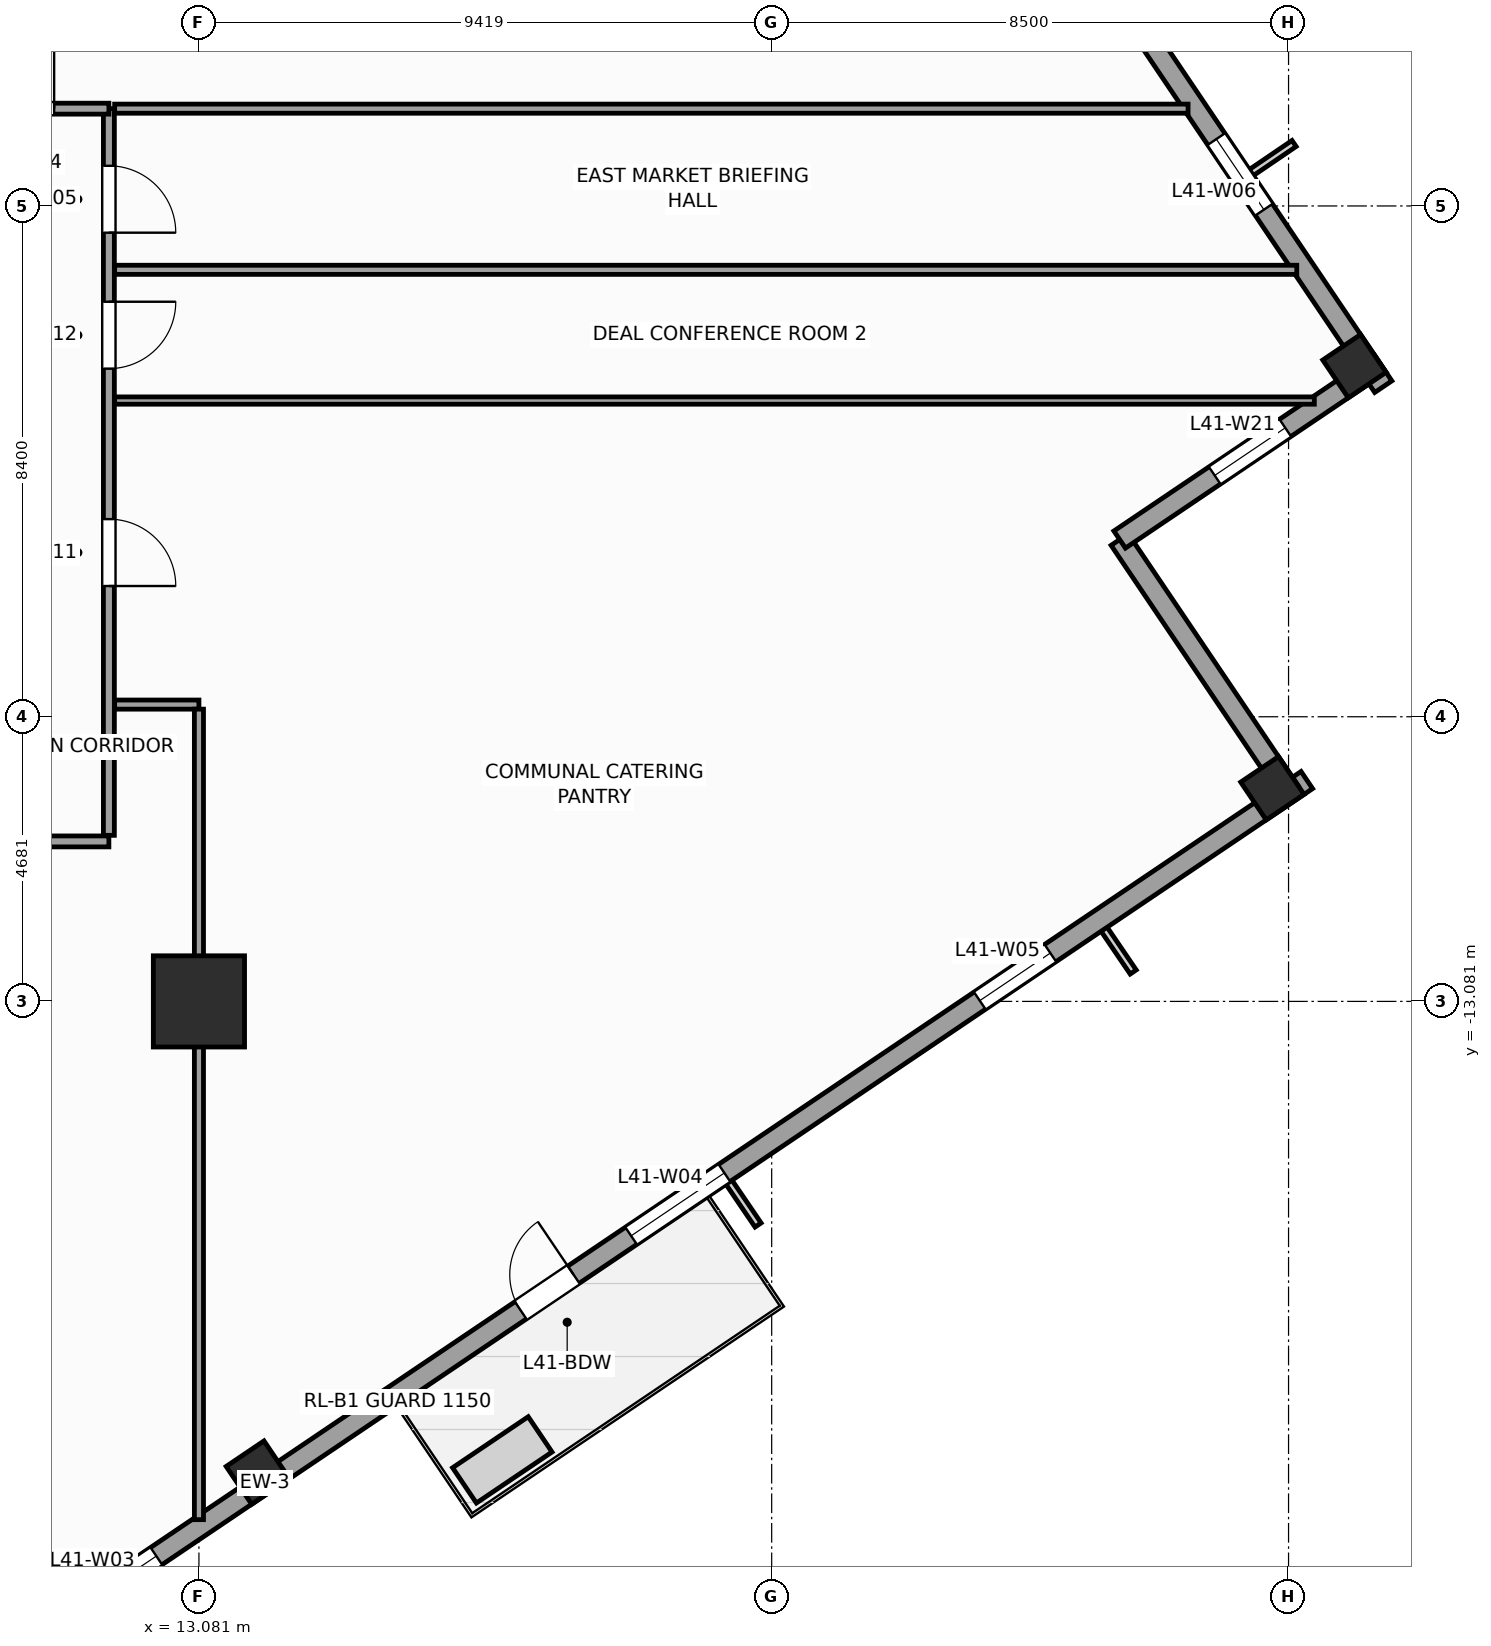
"""IFC4 building model, lengths in metres.
Left out: names, types, materials, properties, quantities, classifications, styles, units other than length and angle.
Written with IfcOpenShell. Run it as: python <this file> out.ifc"""

import sys

from ifc_helpers import new_model, si_unit, direction, frame, frame_2d, origin, origin_2d, place, context, subcontext, project, spatial, rectangle, extrude, source, transform, mapped, element, fill, save


model = new_model("IFC4")
c1 = context("Model", 3, precision=1e-05, world=origin(), true_north=direction((0.0, 1.0)))
c2 = subcontext(c1, "Body", "Model", "MODEL_VIEW")
j1 = project(units=[si_unit("LENGTHUNIT", "METRE"), si_unit("PLANEANGLEUNIT", "RADIAN")], contexts=[c1])
p1 = place(None, origin())
s1 = spatial("IfcSite", under=j1, at=p1, CompositionType="ELEMENT")
p2 = place(p1, origin())
s2 = spatial("IfcBuilding", under=s1, at=p2, CompositionType="ELEMENT")
p3 = place(p2, frame((0.0, 0.0, 172.4)))
s3 = spatial("IfcBuildingStorey", under=s2, at=p3, CompositionType="ELEMENT", Elevation=172.4)
m1 = source(origin(), c2, "Body", "SweptSolid", [
    extrude(rectangle(XDim=1.5, YDim=1.5, at=origin_2d()), origin(), (0.0, 0.0, 1.0), 4.0),
])
p4 = place(p3, frame((13.081, -13.081, 0.0), z_axis=(0.0, 0.0, 1.0), x_axis=(1.0, 0.0, 0.0)))
e1 = element("IfcColumn", 1, at=p4, inside=s3, PredefinedType="COLUMN", context=c2, shape_type="MappedRepresentation", body=[
    mapped(m1, transform((0.0, 0.0, 0.0), scale=1.0)),
])
m2 = source(origin(), c2, "Body", "SweptSolid", [
    extrude(rectangle(XDim=0.75, YDim=0.75, at=origin_2d()), origin(), (0.0, 0.0, 1.0), 4.0),
])
for number, where, z_axis, x_axis in (
    (2, (14.05, -20.83, 0.0), (0.0, 0.0, 1.0), (0.829, 0.559, 0.0)),
    (3, (30.734, -9.576, 0.0), (0.0, 0.0, 1.0), (0.829, 0.559, 0.0)),
    (4, (32.083, -2.635, 0.0), (0.0, 0.0, 1.0), (0.829, 0.559, 0.0)),
):
    element("IfcColumn", number, at=place(p3, frame(where, z_axis=z_axis, x_axis=x_axis)), inside=s3, PredefinedType="COLUMN", context=c2, shape_type="MappedRepresentation", body=[
        mapped(m2, transform((0.0, 0.0, 0.0), scale=1.0)),
    ])
p5 = place(p3, frame((-2.972, -32.558, 0.0), z_axis=(0.0, 0.0, 1.0), x_axis=(0.829036218961, 0.559194910251, 0.0)))
e5 = element("IfcWall", 5, at=p5, inside=s3, PredefinedType="STANDARD", context=c2, shape_type="SweptSolid", body=[
    extrude(rectangle(XDim=41.34, YDim=0.34, at=frame_2d((20.67, 0.0))), origin(), (0.0, 0.0, 1.0), 3.04),
])
p6 = place(p5, frame((25.745, 0.0, 0.0)))
e6 = element("IfcOpeningElement", 6, at=p6, cuts=e5, PredefinedType="OPENING", context=c2, shape_type="SweptSolid", body=[
    extrude(rectangle(XDim=1.05, YDim=2.25, at=frame_2d((0.525, 1.125))), frame((0.0, 0.18, 0.0), z_axis=(0.0, -1.0, 0.0), x_axis=(1.0, 0.0, 0.0)), (0.0, 0.0, 1.0), 0.36),
])
p7 = place(p5, frame((4.261, 0.0, 0.56)))
e7 = element("IfcOpeningElement", 7, at=p7, cuts=e5, PredefinedType="OPENING", context=c2, shape_type="SweptSolid", body=[
    extrude(rectangle(XDim=1.4, YDim=2.4, at=frame_2d((0.7, 1.2))), frame((0.0, 0.18, 0.0), z_axis=(0.0, -1.0, 0.0), x_axis=(1.0, 0.0, 0.0)), (0.0, 0.0, 1.0), 0.36),
])
p8 = place(p5, frame((11.064, 0.0, 0.61)))
e8 = element("IfcOpeningElement", 8, at=p8, cuts=e5, PredefinedType="OPENING", context=c2, shape_type="SweptSolid", body=[
    extrude(rectangle(XDim=1.85, YDim=2.35, at=frame_2d((0.925, 1.175))), frame((0.0, 0.18, 0.0), z_axis=(0.0, -1.0, 0.0), x_axis=(1.0, 0.0, 0.0)), (0.0, 0.0, 1.0), 0.36),
])
p9 = place(p5, frame((16.668, 0.0, 0.61)))
e9 = element("IfcOpeningElement", 9, at=p9, cuts=e5, PredefinedType="OPENING", context=c2, shape_type="SweptSolid", body=[
    extrude(rectangle(XDim=1.85, YDim=2.35, at=frame_2d((0.925, 1.175))), frame((0.0, 0.18, 0.0), z_axis=(0.0, -1.0, 0.0), x_axis=(1.0, 0.0, 0.0)), (0.0, 0.0, 1.0), 0.36),
])
p10 = place(p5, frame((27.936, 0.0, 0.61)))
e10 = element("IfcOpeningElement", 10, at=p10, cuts=e5, PredefinedType="OPENING", context=c2, shape_type="SweptSolid", body=[
    extrude(rectangle(XDim=1.85, YDim=2.35, at=frame_2d((0.925, 1.175))), frame((0.0, 0.18, 0.0), z_axis=(0.0, -1.0, 0.0), x_axis=(1.0, 0.0, 0.0)), (0.0, 0.0, 1.0), 0.36),
])
p11 = place(p5, frame((34.852, 0.0, 0.56)))
e11 = element("IfcOpeningElement", 11, at=p11, cuts=e5, PredefinedType="OPENING", context=c2, shape_type="SweptSolid", body=[
    extrude(rectangle(XDim=1.4, YDim=2.4, at=frame_2d((0.7, 1.2))), frame((0.0, 0.18, 0.0), z_axis=(0.0, -1.0, 0.0), x_axis=(1.0, 0.0, 0.0)), (0.0, 0.0, 1.0), 0.36),
])
p12 = place(p3, frame((31.019, -9.631, 0.0), z_axis=(0.0, 0.0, 1.0), x_axis=(-0.559210350234, 0.829025804298, 0.0)))
e12 = element("IfcWall", 12, at=p12, inside=s3, PredefinedType="STANDARD", context=c2, shape_type="SweptSolid", body=[
    extrude(rectangle(XDim=5.0, YDim=0.34, at=frame_2d((2.5, 0.0))), origin(), (0.0, 0.0, 1.0), 3.74),
])
p13 = place(p3, frame((28.223, -5.486, 0.0), z_axis=(0.0, 0.0, 1.0), x_axis=(0.82905227345, 0.559171107879, 0.0)))
e13 = element("IfcWall", 13, at=p13, inside=s3, PredefinedType="STANDARD", context=c2, shape_type="SweptSolid", body=[
    extrude(rectangle(XDim=5.17, YDim=0.34, at=frame_2d((2.585, 0.0))), origin(), (0.0, 0.0, 1.0), 3.04),
])
p14 = place(p13, frame((1.885, 0.0, 0.56)))
e14 = element("IfcOpeningElement", 14, at=p14, cuts=e13, PredefinedType="OPENING", context=c2, shape_type="SweptSolid", body=[
    extrude(rectangle(XDim=1.4, YDim=2.4, at=frame_2d((0.7, 1.2))), frame((0.0, 0.18, 0.0), z_axis=(0.0, -1.0, 0.0), x_axis=(1.0, 0.0, 0.0)), (0.0, 0.0, 1.0), 0.36),
])
p15 = place(p3, frame((32.558, -2.972, 0.0), z_axis=(0.0, 0.0, 1.0), x_axis=(-0.559194910251, 0.829036218961, 0.0)))
e15 = element("IfcWall", 15, at=p15, inside=s3, PredefinedType="STANDARD", context=c2, shape_type="SweptSolid", body=[
    extrude(rectangle(XDim=41.34, YDim=0.34, at=frame_2d((20.67, 0.0))), origin(), (0.0, 0.0, 1.0), 3.04),
])
p16 = place(p15, frame((3.511, 0.0, 0.56)))
e16 = element("IfcOpeningElement", 16, at=p16, cuts=e15, PredefinedType="OPENING", context=c2, shape_type="SweptSolid", body=[
    extrude(rectangle(XDim=1.4, YDim=2.4, at=frame_2d((0.7, 1.2))), frame((0.0, 0.18, 0.0), z_axis=(0.0, -1.0, 0.0), x_axis=(1.0, 0.0, 0.0)), (0.0, 0.0, 1.0), 0.36),
])
p17 = place(p15, frame((11.064, 0.0, 0.61)))
e17 = element("IfcOpeningElement", 17, at=p17, cuts=e15, PredefinedType="OPENING", context=c2, shape_type="SweptSolid", body=[
    extrude(rectangle(XDim=1.85, YDim=2.35, at=frame_2d((0.925, 1.175))), frame((0.0, 0.18, 0.0), z_axis=(0.0, -1.0, 0.0), x_axis=(1.0, 0.0, 0.0)), (0.0, 0.0, 1.0), 0.36),
])
p18 = place(p15, frame((18.168, 0.0, 0.61)))
e18 = element("IfcOpeningElement", 18, at=p18, cuts=e15, PredefinedType="OPENING", context=c2, shape_type="SweptSolid", body=[
    extrude(rectangle(XDim=1.85, YDim=2.35, at=frame_2d((0.925, 1.175))), frame((0.0, 0.18, 0.0), z_axis=(0.0, -1.0, 0.0), x_axis=(1.0, 0.0, 0.0)), (0.0, 0.0, 1.0), 0.36),
])
p19 = place(p15, frame((27.186, 0.0, 0.61)))
e19 = element("IfcOpeningElement", 19, at=p19, cuts=e15, PredefinedType="OPENING", context=c2, shape_type="SweptSolid", body=[
    extrude(rectangle(XDim=1.85, YDim=2.35, at=frame_2d((0.925, 1.175))), frame((0.0, 0.18, 0.0), z_axis=(0.0, -1.0, 0.0), x_axis=(1.0, 0.0, 0.0)), (0.0, 0.0, 1.0), 0.36),
])
p20 = place(p15, frame((34.852, 0.0, 0.56)))
e20 = element("IfcOpeningElement", 20, at=p20, cuts=e15, PredefinedType="OPENING", context=c2, shape_type="SweptSolid", body=[
    extrude(rectangle(XDim=1.4, YDim=2.4, at=frame_2d((0.7, 1.2))), frame((0.0, 0.18, 0.0), z_axis=(0.0, -1.0, 0.0), x_axis=(1.0, 0.0, 0.0)), (0.0, 0.0, 1.0), 0.36),
])
p21 = place(p3, frame((-10.45, -10.45, 0.0), z_axis=(0.0, 0.0, 1.0), x_axis=(1.0, 0.0, 0.0)))
e21 = element("IfcWall", 21, at=p21, inside=s3, PredefinedType="PARTITIONING", context=c2, shape_type="SweptSolid", body=[
    extrude(rectangle(XDim=22.05, YDim=0.18, at=frame_2d((11.025, 0.0))), origin(), (0.0, 0.0, 1.0), 3.74),
])
p22 = place(p21, frame((15.086, 0.0, 0.0)))
e22 = element("IfcOpeningElement", 22, at=p22, cuts=e21, PredefinedType="OPENING", context=c2, shape_type="SweptSolid", body=[
    extrude(rectangle(XDim=0.95, YDim=2.1, at=frame_2d((0.475, 1.05))), frame((0.0, 0.1, 0.0), z_axis=(0.0, -1.0, 0.0), x_axis=(1.0, 0.0, 0.0)), (0.0, 0.0, 1.0), 0.2),
])
p23 = place(p21, frame((7.611, 0.0, 0.0)))
e23 = element("IfcOpeningElement", 23, at=p23, cuts=e21, PredefinedType="OPENING", context=c2, shape_type="SweptSolid", body=[
    extrude(rectangle(XDim=0.95, YDim=2.1, at=frame_2d((0.475, 1.05))), frame((0.0, 0.1, 0.0), z_axis=(0.0, -1.0, 0.0), x_axis=(1.0, 0.0, 0.0)), (0.0, 0.0, 1.0), 0.2),
])
p24 = place(p21, frame((2.939, 0.0, 0.0)))
e24 = element("IfcOpeningElement", 24, at=p24, cuts=e21, PredefinedType="OPENING", context=c2, shape_type="SweptSolid", body=[
    extrude(rectangle(XDim=1.1, YDim=2.2, at=frame_2d((0.55, 1.1))), frame((0.0, 0.1, 0.0), z_axis=(0.0, -1.0, 0.0), x_axis=(1.0, 0.0, 0.0)), (0.0, 0.0, 1.0), 0.2),
])
p25 = place(p21, frame((11.175, 0.0, 0.0)))
e25 = element("IfcOpeningElement", 25, at=p25, cuts=e21, PredefinedType="OPENING", context=c2, shape_type="SweptSolid", body=[
    extrude(rectangle(XDim=1.1, YDim=2.2, at=frame_2d((0.55, 1.1))), frame((0.0, 0.1, 0.0), z_axis=(0.0, -1.0, 0.0), x_axis=(1.0, 0.0, 0.0)), (0.0, 0.0, 1.0), 0.2),
])
p26 = place(p21, frame((18.805, 0.0, 0.0)))
e26 = element("IfcOpeningElement", 26, at=p26, cuts=e21, PredefinedType="OPENING", context=c2, shape_type="SweptSolid", body=[
    extrude(rectangle(XDim=1.1, YDim=2.2, at=frame_2d((0.55, 1.1))), frame((0.0, 0.1, 0.0), z_axis=(0.0, -1.0, 0.0), x_axis=(1.0, 0.0, 0.0)), (0.0, 0.0, 1.0), 0.2),
])
p27 = place(p3, frame((11.6, -10.35, 0.0), z_axis=(0.0, 0.0, 1.0), x_axis=(0.0, 1.0, 0.0)))
e27 = element("IfcWall", 27, at=p27, inside=s3, PredefinedType="PARTITIONING", context=c2, shape_type="SweptSolid", body=[
    extrude(rectangle(XDim=11.95, YDim=0.18, at=frame_2d((5.975, 0.0))), origin(), (0.0, 0.0, 1.0), 3.74),
])
p28 = place(p27, frame((9.911, 0.0, 0.0)))
e28 = element("IfcOpeningElement", 28, at=p28, cuts=e27, PredefinedType="OPENING", context=c2, shape_type="SweptSolid", body=[
    extrude(rectangle(XDim=1.1, YDim=2.2, at=frame_2d((0.55, 1.1))), frame((0.0, 0.1, 0.0), z_axis=(0.0, -1.0, 0.0), x_axis=(1.0, 0.0, 0.0)), (0.0, 0.0, 1.0), 0.2),
])
p29 = place(p27, frame((4.1, 0.0, 0.0)))
e29 = element("IfcOpeningElement", 29, at=p29, cuts=e27, PredefinedType="OPENING", context=c2, shape_type="SweptSolid", body=[
    extrude(rectangle(XDim=1.1, YDim=2.2, at=frame_2d((0.55, 1.1))), frame((0.0, 0.1, 0.0), z_axis=(0.0, -1.0, 0.0), x_axis=(1.0, 0.0, 0.0)), (0.0, 0.0, 1.0), 0.2),
])
p30 = place(p27, frame((7.675, 0.0, 0.0)))
e30 = element("IfcOpeningElement", 30, at=p30, cuts=e27, PredefinedType="OPENING", context=c2, shape_type="SweptSolid", body=[
    extrude(rectangle(XDim=1.1, YDim=2.2, at=frame_2d((0.55, 1.1))), frame((0.0, 0.1, 0.0), z_axis=(0.0, -1.0, 0.0), x_axis=(1.0, 0.0, 0.0)), (0.0, 0.0, 1.0), 0.2),
])
p31 = place(p3, frame((8.7, 1.6, 0.0), z_axis=(0.0, 0.0, 1.0), x_axis=(1.0, 0.0, 0.0)))
e31 = element("IfcWall", 31, at=p31, inside=s3, PredefinedType="PARTITIONING", context=c2, shape_type="SweptSolid", body=[
    extrude(rectangle(XDim=2.9, YDim=0.18, at=frame_2d((1.45, 0.0))), origin(), (0.0, 0.0, 1.0), 3.74),
])
p32 = place(p31, frame((0.9, 0.0, 0.0)))
e32 = element("IfcOpeningElement", 32, at=p32, cuts=e31, PredefinedType="OPENING", context=c2, shape_type="SweptSolid", body=[
    extrude(rectangle(XDim=1.1, YDim=2.2, at=frame_2d((0.55, 1.1))), frame((0.0, 0.1, 0.0), z_axis=(0.0, -1.0, 0.0), x_axis=(1.0, 0.0, 0.0)), (0.0, 0.0, 1.0), 0.2),
])
p33 = place(p3, frame((11.695, -1.05, 0.0), z_axis=(0.0, 0.0, 1.0), x_axis=(1.0, 0.0, 0.0)))
e33 = element("IfcWall", 33, at=p33, inside=s3, PredefinedType="PARTITIONING", context=c2, shape_type="SweptSolid", body=[
    extrude(rectangle(XDim=19.44, YDim=0.15, at=frame_2d((9.72, 0.0))), origin(), (0.0, 0.0, 1.0), 3.74),
])
p34 = place(p3, frame((11.695, 1.6, 0.0), z_axis=(0.0, 0.0, 1.0), x_axis=(1.0, 0.0, 0.0)))
e34 = element("IfcWall", 34, at=p34, inside=s3, PredefinedType="PARTITIONING", context=c2, shape_type="SweptSolid", body=[
    extrude(rectangle(XDim=17.653, YDim=0.15, at=frame_2d((8.826, 0.0))), origin(), (0.0, 0.0, 1.0), 3.74),
])
p35 = place(p3, frame((11.695, -8.2, 0.0), z_axis=(0.0, 0.0, 1.0), x_axis=(1.0, 0.0, 0.0)))
e35 = element("IfcWall", 35, at=p35, inside=s3, PredefinedType="PARTITIONING", context=c2, shape_type="SweptSolid", body=[
    extrude(rectangle(XDim=1.386, YDim=0.15, at=frame_2d((0.693, 0.0))), origin(), (0.0, 0.0, 1.0), 3.74),
])
p36 = place(p3, frame((13.081, -8.275, 0.0), z_axis=(0.0, 0.0, 1.0), x_axis=(0.0, -1.0, 0.0)))
e36 = element("IfcWall", 36, at=p36, inside=s3, PredefinedType="PARTITIONING", context=c2, shape_type="SweptSolid", body=[
    extrude(rectangle(XDim=13.329, YDim=0.15, at=frame_2d((6.664, 0.0))), origin(), (0.0, 0.0, 1.0), 2.84),
])
p37 = place(p3, frame((11.695, -3.2, 0.0), z_axis=(0.0, 0.0, 1.0), x_axis=(1.0, 0.0, 0.0)))
e37 = element("IfcWall", 37, at=p37, inside=s3, PredefinedType="PARTITIONING", context=c2, shape_type="SweptSolid", body=[
    extrude(rectangle(XDim=19.729, YDim=0.12, at=frame_2d((9.865, 0.0))), origin(), (0.0, 0.0, 1.0), 3.74),
])
m3 = source(origin(), c2, "Body", "SweptSolid", [
    extrude(rectangle(XDim=1.05, YDim=2.25, at=frame_2d((0.525, 1.125))), frame((0.0, 0.025, 0.0), z_axis=(0.0, -1.0, 0.0), x_axis=(1.0, 0.0, 0.0)), (0.0, 0.0, 1.0), 0.05),
])
p38 = place(p6, origin())
e38 = element("IfcDoor", 38, at=p38, inside=s3, OperationType="SINGLE_SWING_RIGHT", PredefinedType="DOOR", context=c2, shape_type="MappedRepresentation", body=[
    mapped(m3, transform((0.0, 0.0, 0.0), scale=1.0)),
])
fill(e6, e38)
m4 = source(origin(), c2, "Body", "SweptSolid", [
    extrude(rectangle(XDim=1.85, YDim=2.35, at=frame_2d((0.925, 1.175))), frame((0.0, 0.03, 0.0), z_axis=(0.0, -1.0, 0.0), x_axis=(1.0, 0.0, 0.0)), (0.0, 0.0, 1.0), 0.06),
])
p39 = place(p9, origin())
e39 = element("IfcWindow", 39, at=p39, inside=s3, PartitioningType="SINGLE_PANEL", PredefinedType="WINDOW", context=c2, shape_type="MappedRepresentation", body=[
    mapped(m4, transform((0.0, 0.0, 0.0), scale=1.0)),
])
fill(e9, e39)
p40 = place(p10, origin())
e40 = element("IfcWindow", 40, at=p40, inside=s3, PartitioningType="SINGLE_PANEL", PredefinedType="WINDOW", context=c2, shape_type="MappedRepresentation", body=[
    mapped(m4, transform((0.0, 0.0, 0.0), scale=1.0)),
])
fill(e10, e40)
m5 = source(origin(), c2, "Body", "SweptSolid", [
    extrude(rectangle(XDim=1.4, YDim=2.4, at=frame_2d((0.7, 1.2))), frame((0.0, 0.03, 0.0), z_axis=(0.0, -1.0, 0.0), x_axis=(1.0, 0.0, 0.0)), (0.0, 0.0, 1.0), 0.06),
])
p41 = place(p11, origin())
e41 = element("IfcWindow", 41, at=p41, inside=s3, PartitioningType="SINGLE_PANEL", PredefinedType="WINDOW", context=c2, shape_type="MappedRepresentation", body=[
    mapped(m5, transform((0.0, 0.0, 0.0), scale=1.0)),
])
fill(e11, e41)
p42 = place(p16, origin())
e42 = element("IfcWindow", 42, at=p42, inside=s3, PartitioningType="SINGLE_PANEL", PredefinedType="WINDOW", context=c2, shape_type="MappedRepresentation", body=[
    mapped(m5, transform((0.0, 0.0, 0.0), scale=1.0)),
])
fill(e16, e42)
p43 = place(p14, origin())
e43 = element("IfcWindow", 43, at=p43, inside=s3, PartitioningType="SINGLE_PANEL", PredefinedType="WINDOW", context=c2, shape_type="MappedRepresentation", body=[
    mapped(m5, transform((0.0, 0.0, 0.0), scale=1.0)),
])
fill(e14, e43)
m6 = source(origin(), c2, "Body", "SweptSolid", [
    extrude(rectangle(XDim=1.1, YDim=2.2, at=frame_2d((0.55, 1.1))), frame((0.0, 0.025, 0.0), z_axis=(0.0, -1.0, 0.0), x_axis=(1.0, 0.0, 0.0)), (0.0, 0.0, 1.0), 0.05),
])
p44 = place(p32, origin())
e44 = element("IfcDoor", 44, at=p44, inside=s3, OperationType="SINGLE_SWING_RIGHT", PredefinedType="DOOR", context=c2, shape_type="MappedRepresentation", body=[
    mapped(m6, transform((0.0, 0.0, 0.0), scale=1.0)),
])
fill(e32, e44)
p45 = place(p28, frame((1.1, 0.0, 0.0), z_axis=(0.0, 0.0, 1.0), x_axis=(-1.0, 0.0, 0.0)))
e45 = element("IfcDoor", 45, at=p45, inside=s3, OperationType="SINGLE_SWING_LEFT", PredefinedType="DOOR", context=c2, shape_type="MappedRepresentation", body=[
    mapped(m6, transform((0.0, 0.0, 0.0), scale=1.0)),
])
fill(e28, e45)
p46 = place(p29, frame((1.1, 0.0, 0.0), z_axis=(0.0, 0.0, 1.0), x_axis=(-1.0, 0.0, 0.0)))
e46 = element("IfcDoor", 46, at=p46, inside=s3, OperationType="SINGLE_SWING_LEFT", PredefinedType="DOOR", context=c2, shape_type="MappedRepresentation", body=[
    mapped(m6, transform((0.0, 0.0, 0.0), scale=1.0)),
])
fill(e29, e46)
p47 = place(p30, frame((1.1, 0.0, 0.0), z_axis=(0.0, 0.0, 1.0), x_axis=(-1.0, 0.0, 0.0)))
e47 = element("IfcDoor", 47, at=p47, inside=s3, OperationType="SINGLE_SWING_RIGHT", PredefinedType="DOOR", context=c2, shape_type="MappedRepresentation", body=[
    mapped(m6, transform((0.0, 0.0, 0.0), scale=1.0)),
])
fill(e30, e47)
save(model, sys.argv[1])
